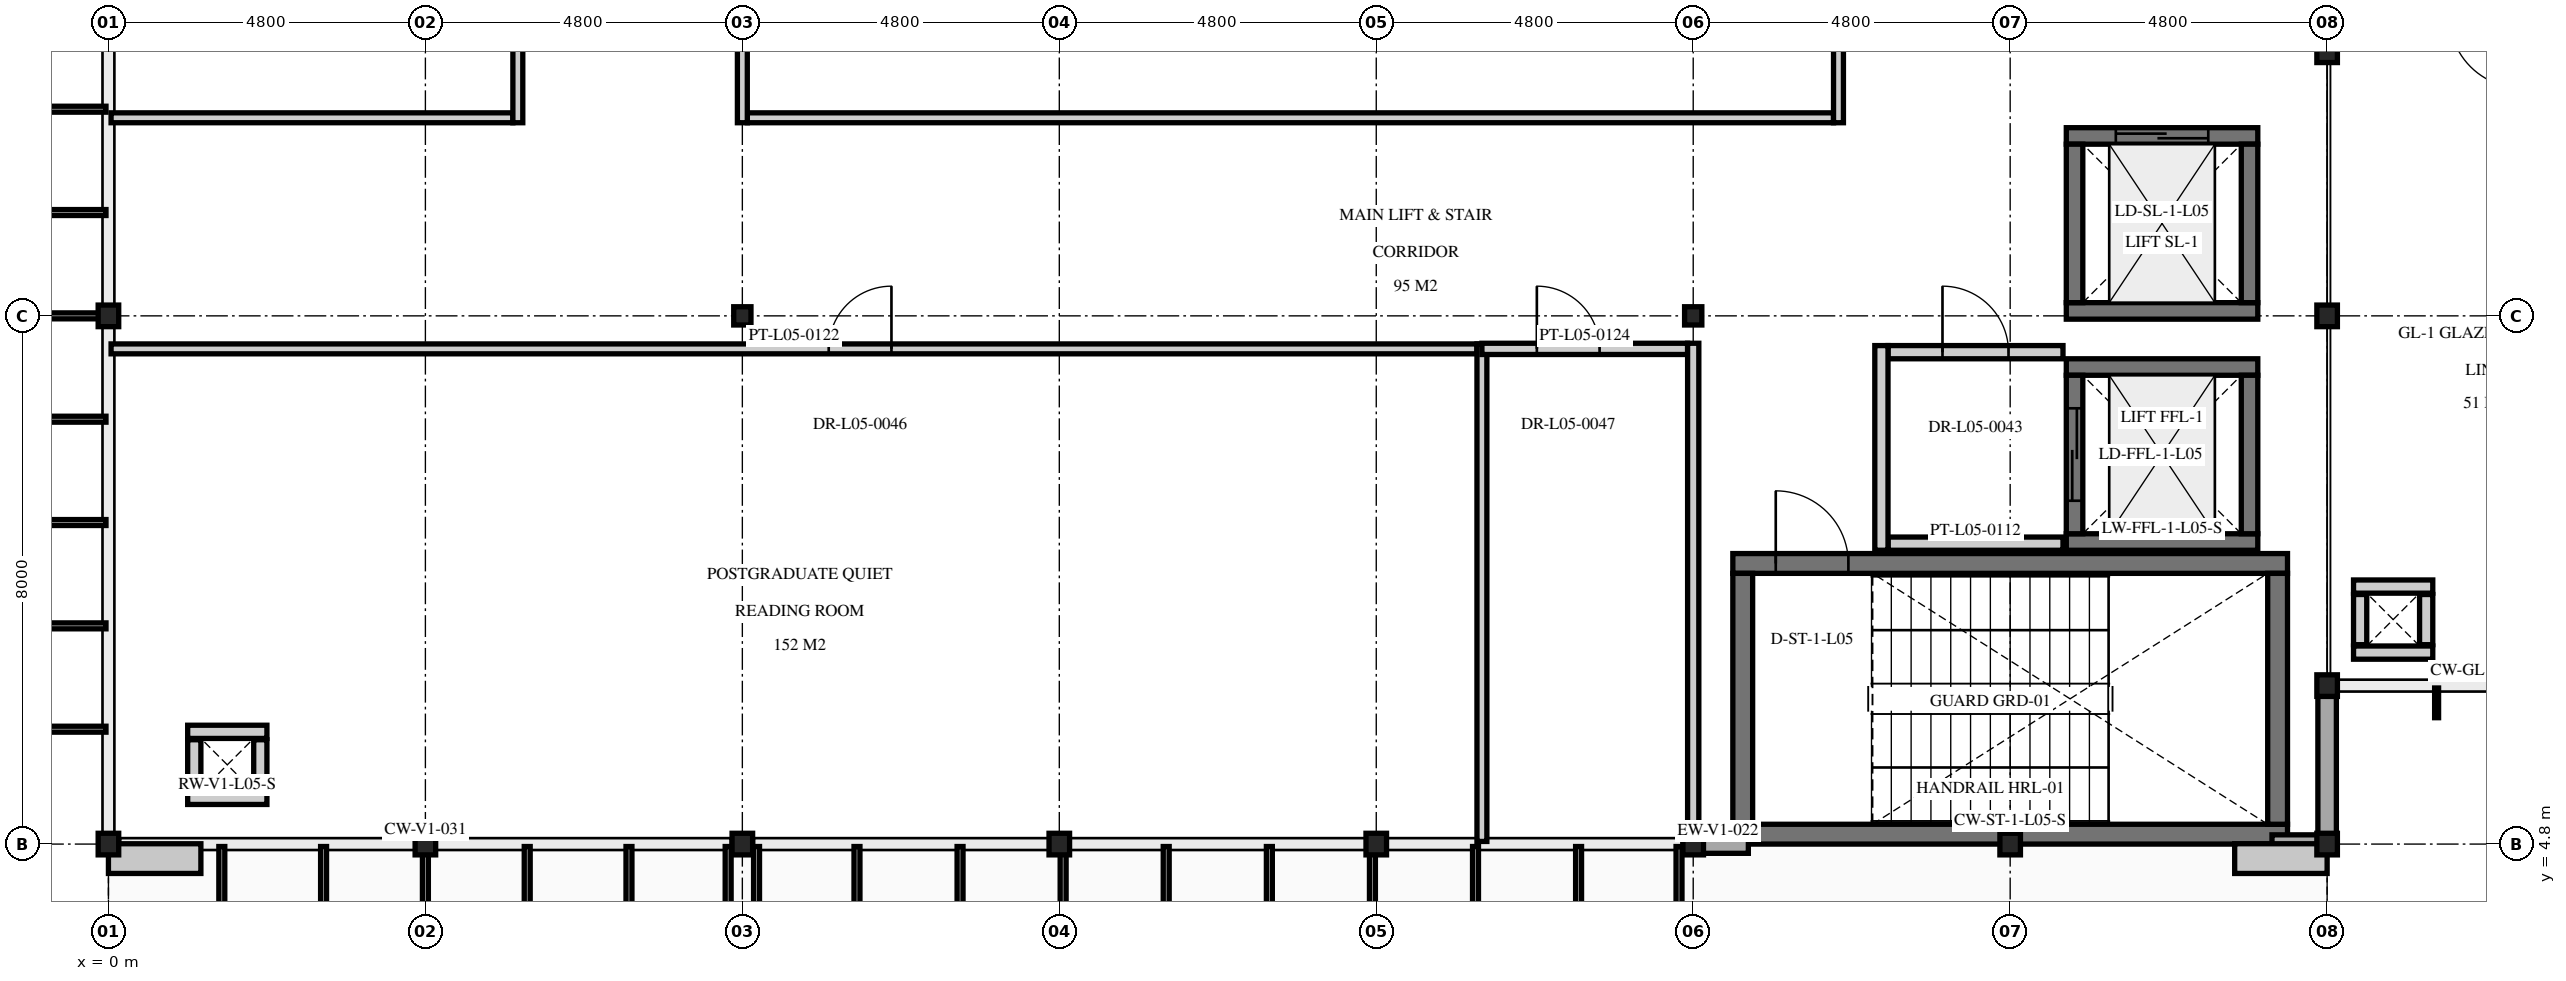
"""IFC4 building model, lengths in metres.
Left out: names, types, materials, properties, quantities, classifications, styles, units other than length and angle.
Written with IfcOpenShell. Run it as: python <this file> out.ifc"""

import sys

from ifc_helpers import new_model, si_unit, direction, frame, frame_2d, origin, origin_2d, place, context, subcontext, project, spatial, rectangle, i_section, extrude, element, fill, save


model = new_model("IFC4")
c1 = context("Model", 3, precision=1e-05, world=origin(), true_north=direction((0.0, 1.0)))
c2 = subcontext(c1, "Body", "Model", "MODEL_VIEW")
j1 = project(units=[si_unit("LENGTHUNIT", "METRE"), si_unit("PLANEANGLEUNIT", "RADIAN")], contexts=[c1])
p1 = place(None, origin())
s1 = spatial("IfcSite", under=j1, at=p1, CompositionType="ELEMENT")
p2 = place(p1, origin())
s2 = spatial("IfcBuilding", under=s1, at=p2, CompositionType="ELEMENT")
p3 = place(p2, frame((0.0, 0.0, 23.1)))
s3 = spatial("IfcBuildingStorey", under=s2, at=p3, CompositionType="ELEMENT", Elevation=23.1)
for number, where, z_axis, x_axis in (
    (1, (0.0, 4.8, 0.0), (0.0, 0.0, 1.0), (1.0, 0.0, 0.0)),
    (2, (4.8, 4.8, 0.0), (0.0, 0.0, 1.0), (1.0, 0.0, 0.0)),
    (3, (9.6, 4.8, 0.0), (0.0, 0.0, 1.0), (1.0, 0.0, 0.0)),
    (4, (14.4, 4.8, 0.0), (0.0, 0.0, 1.0), (1.0, 0.0, 0.0)),
    (5, (19.2, 4.8, 0.0), (0.0, 0.0, 1.0), (1.0, 0.0, 0.0)),
    (6, (24.0, 4.8, 0.0), (0.0, 0.0, 1.0), (1.0, 0.0, 0.0)),
    (7, (28.8, 4.8, 0.0), (0.0, 0.0, 1.0), (1.0, 0.0, 0.0)),
    (8, (33.6, 4.8, 0.0), (0.0, 0.0, 1.0), (1.0, 0.0, 0.0)),
    (9, (0.0, 12.8, 0.0), (0.0, 0.0, 1.0), (1.0, 0.0, 0.0)),
    (10, (33.6, 7.2, 0.0), (0.0, 0.0, 1.0), (1.0, 0.0, 0.0)),
    (11, (33.6, 12.8, 0.0), (0.0, 0.0, 1.0), (1.0, 0.0, 0.0)),
    (12, (33.6, 16.8, 0.0), (0.0, 0.0, 1.0), (1.0, 0.0, 0.0)),
):
    element("IfcColumn", number, at=place(p3, frame(where, z_axis=z_axis, x_axis=x_axis)), inside=s3, PredefinedType="COLUMN", context=c2, shape_type="SweptSolid", body=[
        extrude(i_section(OverallWidth=0.311, OverallDepth=0.327, WebThickness=0.016, FlangeThickness=0.025, at=origin_2d()), origin(), (0.0, 0.0, 1.0), 4.5),
    ])
for number, where, z_axis, x_axis in (
    (13, (9.6, 12.8, 0.0), (0.0, 0.0, 1.0), (1.0, 0.0, 0.0)),
    (14, (24.0, 12.8, 0.0), (0.0, 0.0, 1.0), (1.0, 0.0, 0.0)),
):
    element("IfcColumn", number, at=place(p3, frame(where, z_axis=z_axis, x_axis=x_axis)), inside=s3, PredefinedType="COLUMN", context=c2, shape_type="SweptSolid", body=[
        extrude(i_section(OverallWidth=0.261, OverallDepth=0.276, WebThickness=0.015, FlangeThickness=0.025, at=origin_2d()), origin(), (0.0, 0.0, 1.0), 4.31),
    ])
p4 = place(p3, frame((33.0, 4.95, 0.0), z_axis=(0.0, 0.0, 1.0), x_axis=(-1.0, 0.0, 0.0)))
e15 = element("IfcWall", 15, at=p4, inside=s3, PredefinedType="SHEAR", context=c2, shape_type="SweptSolid", body=[
    extrude(rectangle(XDim=8.4, YDim=0.3, at=frame_2d((4.2, 0.0))), origin(), (0.0, 0.0, 1.0), 4.29),
])
p5 = place(p3, frame((24.6, 9.05, 0.0), z_axis=(0.0, 0.0, 1.0), x_axis=(1.0, 0.0, 0.0)))
e16 = element("IfcWall", 16, at=p5, inside=s3, PredefinedType="SHEAR", context=c2, shape_type="SweptSolid", body=[
    extrude(rectangle(XDim=8.4, YDim=0.3, at=frame_2d((4.2, 0.0))), origin(), (0.0, 0.0, 1.0), 4.29),
])
p6 = place(p5, frame((0.65, 0.0, 0.0)))
e17 = element("IfcOpeningElement", 17, at=p6, cuts=e16, PredefinedType="OPENING", context=c2, shape_type="SweptSolid", body=[
    extrude(rectangle(XDim=1.1, YDim=2.2, at=frame_2d((0.55, 1.1))), frame((0.0, 0.16, 0.0), z_axis=(0.0, -1.0, 0.0), x_axis=(1.0, 0.0, 0.0)), (0.0, 0.0, 1.0), 0.32),
])
for number, where, z_axis, x_axis in (
    (18, (24.75, 5.1, 0.0), (0.0, 0.0, 1.0), (0.0, 1.0, 0.0)),
    (19, (32.85, 8.9, 0.0), (0.0, 0.0, 1.0), (0.0, -1.0, 0.0)),
):
    element("IfcWall", number, at=place(p3, frame(where, z_axis=z_axis, x_axis=x_axis)), inside=s3, PredefinedType="SHEAR", context=c2, shape_type="SweptSolid", body=[
        extrude(rectangle(XDim=3.8, YDim=0.3, at=frame_2d((1.9, 0.0))), origin(), (0.0, 0.0, 1.0), 4.29),
    ])
for number, where, z_axis, x_axis in (
    (20, (32.55, 9.375, 0.0), (0.0, 0.0, 1.0), (-1.0, 0.0, 0.0)),
    (21, (29.65, 12.025, 0.0), (0.0, 0.0, 1.0), (1.0, 0.0, 0.0)),
):
    element("IfcWall", number, at=place(p3, frame(where, z_axis=z_axis, x_axis=x_axis)), inside=s3, PredefinedType="SHEAR", context=c2, shape_type="SweptSolid", body=[
        extrude(rectangle(XDim=2.9, YDim=0.25, at=frame_2d((1.45, 0.0))), origin(), (0.0, 0.0, 1.0), 4.29),
    ])
p7 = place(p3, frame((29.775, 9.5, 0.0), z_axis=(0.0, 0.0, 1.0), x_axis=(0.0, 1.0, 0.0)))
e22 = element("IfcWall", 22, at=p7, inside=s3, PredefinedType="SHEAR", context=c2, shape_type="SweptSolid", body=[
    extrude(rectangle(XDim=2.4, YDim=0.25, at=frame_2d((1.2, 0.0))), origin(), (0.0, 0.0, 1.0), 4.29),
])
p8 = place(p7, frame((0.5, 0.0, 0.0)))
e23 = element("IfcOpeningElement", 23, at=p8, cuts=e22, PredefinedType="OPENING", context=c2, shape_type="SweptSolid", body=[
    extrude(rectangle(XDim=1.4, YDim=2.2, at=frame_2d((0.7, 1.1))), frame((0.0, 0.135, 0.0), z_axis=(0.0, -1.0, 0.0), x_axis=(1.0, 0.0, 0.0)), (0.0, 0.0, 1.0), 0.27),
])
p9 = place(p3, frame((32.425, 11.9, 0.0), z_axis=(0.0, 0.0, 1.0), x_axis=(0.0, -1.0, 0.0)))
e24 = element("IfcWall", 24, at=p9, inside=s3, PredefinedType="SHEAR", context=c2, shape_type="SweptSolid", body=[
    extrude(rectangle(XDim=2.4, YDim=0.25, at=frame_2d((1.2, 0.0))), origin(), (0.0, 0.0, 1.0), 4.29),
])
p10 = place(p3, frame((32.55, 12.875, 0.0), z_axis=(0.0, 0.0, 1.0), x_axis=(-1.0, 0.0, 0.0)))
e25 = element("IfcWall", 25, at=p10, inside=s3, PredefinedType="SHEAR", context=c2, shape_type="SweptSolid", body=[
    extrude(rectangle(XDim=2.9, YDim=0.25, at=frame_2d((1.45, 0.0))), origin(), (0.0, 0.0, 1.0), 4.29),
])
p11 = place(p3, frame((29.65, 15.525, 0.0), z_axis=(0.0, 0.0, 1.0), x_axis=(1.0, 0.0, 0.0)))
e26 = element("IfcWall", 26, at=p11, inside=s3, PredefinedType="SHEAR", context=c2, shape_type="SweptSolid", body=[
    extrude(rectangle(XDim=2.9, YDim=0.25, at=frame_2d((1.45, 0.0))), origin(), (0.0, 0.0, 1.0), 4.29),
])
p12 = place(p11, frame((0.75, 0.0, 0.0)))
e27 = element("IfcOpeningElement", 27, at=p12, cuts=e26, PredefinedType="OPENING", context=c2, shape_type="SweptSolid", body=[
    extrude(rectangle(XDim=1.4, YDim=2.2, at=frame_2d((0.7, 1.1))), frame((0.0, 0.135, 0.0), z_axis=(0.0, -1.0, 0.0), x_axis=(1.0, 0.0, 0.0)), (0.0, 0.0, 1.0), 0.27),
])
for number, where, z_axis, x_axis in (
    (28, (29.775, 13.0, 0.0), (0.0, 0.0, 1.0), (0.0, 1.0, 0.0)),
    (29, (32.425, 15.4, 0.0), (0.0, 0.0, 1.0), (0.0, -1.0, 0.0)),
):
    element("IfcWall", number, at=place(p3, frame(where, z_axis=z_axis, x_axis=x_axis)), inside=s3, PredefinedType="SHEAR", context=c2, shape_type="SweptSolid", body=[
        extrude(rectangle(XDim=2.4, YDim=0.25, at=frame_2d((1.2, 0.0))), origin(), (0.0, 0.0, 1.0), 4.29),
    ])
for number, where, z_axis, x_axis in (
    (30, (2.4, 5.5, 0.0), (0.0, 0.0, 1.0), (-1.0, 0.0, 0.0)),
    (31, (1.2, 6.5, 0.0), (0.0, 0.0, 1.0), (1.0, 0.0, 0.0)),
):
    element("IfcWall", number, at=place(p3, frame(where, z_axis=z_axis, x_axis=x_axis)), inside=s3, PredefinedType="PARTITIONING", context=c2, shape_type="SweptSolid", body=[
        extrude(rectangle(XDim=1.2, YDim=0.2, at=frame_2d((0.6, 0.0))), origin(), (0.0, 0.0, 1.0), 3.79),
    ])
for number, where, z_axis, x_axis in (
    (32, (1.3, 5.62, 0.0), (0.0, 0.0, 1.0), (0.0, 1.0, 0.0)),
    (33, (2.3, 6.38, 0.0), (0.0, 0.0, 1.0), (0.0, -1.0, 0.0)),
):
    element("IfcWall", number, at=place(p3, frame(where, z_axis=z_axis, x_axis=x_axis)), inside=s3, PredefinedType="PARTITIONING", context=c2, shape_type="SweptSolid", body=[
        extrude(rectangle(XDim=0.76, YDim=0.2, at=frame_2d((0.38, 0.0))), origin(), (0.0, 0.0, 1.0), 3.79),
    ])
for number, where, z_axis, x_axis in (
    (34, (35.2, 7.7, 0.0), (0.0, 0.0, 1.0), (-1.0, 0.0, 0.0)),
    (35, (34.0, 8.7, 0.0), (0.0, 0.0, 1.0), (1.0, 0.0, 0.0)),
):
    element("IfcWall", number, at=place(p3, frame(where, z_axis=z_axis, x_axis=x_axis)), inside=s3, PredefinedType="PARTITIONING", context=c2, shape_type="SweptSolid", body=[
        extrude(rectangle(XDim=1.2, YDim=0.2, at=frame_2d((0.6, 0.0))), origin(), (0.0, 0.0, 1.0), 3.79),
    ])
for number, where, z_axis, x_axis in (
    (36, (34.1, 7.82, 0.0), (0.0, 0.0, 1.0), (0.0, 1.0, 0.0)),
    (37, (35.1, 8.58, 0.0), (0.0, 0.0, 1.0), (0.0, -1.0, 0.0)),
):
    element("IfcWall", number, at=place(p3, frame(where, z_axis=z_axis, x_axis=x_axis)), inside=s3, PredefinedType="PARTITIONING", context=c2, shape_type="SweptSolid", body=[
        extrude(rectangle(XDim=0.76, YDim=0.2, at=frame_2d((0.38, 0.0))), origin(), (0.0, 0.0, 1.0), 3.79),
    ])
p13 = place(p3, frame((24.835, 4.8, 0.0), z_axis=(0.0, 0.0, 1.0), x_axis=(-1.0, 0.0, 0.0)))
e38 = element("IfcWall", 38, at=p13, inside=s3, PredefinedType="SOLIDWALL", context=c2, shape_type="SweptSolid", body=[
    extrude(rectangle(XDim=0.92, YDim=0.28, at=frame_2d((0.46, 0.0))), origin(), (0.0, 0.0, 1.0), 3.653),
])
p14 = place(p3, frame((33.685, 4.8, 0.0), z_axis=(0.0, 0.0, 1.0), x_axis=(-1.0, 0.0, 0.0)))
e39 = element("IfcWall", 39, at=p14, inside=s3, PredefinedType="SOLIDWALL", context=c2, shape_type="SweptSolid", body=[
    extrude(rectangle(XDim=0.92, YDim=0.28, at=frame_2d((0.46, 0.0))), origin(), (0.0, 0.0, 1.0), 3.653),
])
p15 = place(p3, frame((33.6, 7.285, 0.0), z_axis=(0.0, 0.0, 1.0), x_axis=(0.0, -1.0, 0.0)))
e40 = element("IfcWall", 40, at=p15, inside=s3, PredefinedType="SOLIDWALL", context=c2, shape_type="SweptSolid", body=[
    extrude(rectangle(XDim=2.57, YDim=0.28, at=frame_2d((1.285, 0.0))), origin(), (0.0, 0.0, 1.0), 3.653),
])
p16 = place(p3, frame((26.95, 9.35, 0.0), z_axis=(0.0, 0.0, 1.0), x_axis=(1.0, 0.0, 0.0)))
e41 = element("IfcWall", 41, at=p16, inside=s3, PredefinedType="PARTITIONING", context=c2, shape_type="SweptSolid", body=[
    extrude(rectangle(XDim=2.65, YDim=0.2, at=frame_2d((1.325, 0.0))), origin(), (0.0, 0.0, 1.0), 4.29),
])
p17 = place(p3, frame((26.95, 12.25, 0.0), z_axis=(0.0, 0.0, 1.0), x_axis=(1.0, 0.0, 0.0)))
e42 = element("IfcWall", 42, at=p17, inside=s3, PredefinedType="PARTITIONING", context=c2, shape_type="SweptSolid", body=[
    extrude(rectangle(XDim=2.65, YDim=0.2, at=frame_2d((1.325, 0.0))), origin(), (0.0, 0.0, 1.0), 4.29),
])
p18 = place(p17, frame((0.825, 0.0, 0.0)))
e43 = element("IfcOpeningElement", 43, at=p18, cuts=e42, PredefinedType="OPENING", context=c2, shape_type="SweptSolid", body=[
    extrude(rectangle(XDim=1.0, YDim=2.2, at=frame_2d((0.5, 1.1))), frame((0.0, 0.11, 0.0), z_axis=(0.0, -1.0, 0.0), x_axis=(1.0, 0.0, 0.0)), (0.0, 0.0, 1.0), 0.22),
])
p19 = place(p3, frame((26.85, 9.25, 0.0), z_axis=(0.0, 0.0, 1.0), x_axis=(0.0, 1.0, 0.0)))
e44 = element("IfcWall", 44, at=p19, inside=s3, PredefinedType="PARTITIONING", context=c2, shape_type="SweptSolid", body=[
    extrude(rectangle(XDim=3.1, YDim=0.2, at=frame_2d((1.55, 0.0))), origin(), (0.0, 0.0, 1.0), 4.29),
])
p20 = place(p3, frame((0.04, 12.3, 0.0), z_axis=(0.0, 0.0, 1.0), x_axis=(1.0, 0.0, 0.0)))
e45 = element("IfcWall", 45, at=p20, inside=s3, PredefinedType="PARTITIONING", context=c2, shape_type="SweptSolid", body=[
    extrude(rectangle(XDim=20.685, YDim=0.15, at=frame_2d((10.343, 0.0))), origin(), (0.0, 0.0, 1.0), 3.662),
])
p21 = place(p20, frame((10.868, 0.0, 0.0)))
e46 = element("IfcOpeningElement", 46, at=p21, cuts=e45, PredefinedType="OPENING", context=c2, shape_type="SweptSolid", body=[
    extrude(rectangle(XDim=0.95, YDim=2.15, at=frame_2d((0.475, 1.075))), frame((0.0, 0.085, 0.0), z_axis=(0.0, -1.0, 0.0), x_axis=(1.0, 0.0, 0.0)), (0.0, 0.0, 1.0), 0.17),
])
p22 = place(p3, frame((20.8, 4.84, 0.0), z_axis=(0.0, 0.0, 1.0), x_axis=(0.0, 1.0, 0.0)))
e47 = element("IfcWall", 47, at=p22, inside=s3, PredefinedType="PARTITIONING", context=c2, shape_type="SweptSolid", body=[
    extrude(rectangle(XDim=7.535, YDim=0.15, at=frame_2d((3.768, 0.0))), origin(), (0.0, 0.0, 1.0), 3.653),
])
p23 = place(p3, frame((20.8, 12.3, 0.0), z_axis=(0.0, 0.0, 1.0), x_axis=(1.0, 0.0, 0.0)))
e48 = element("IfcWall", 48, at=p23, inside=s3, PredefinedType="PARTITIONING", context=c2, shape_type="SweptSolid", body=[
    extrude(rectangle(XDim=3.115, YDim=0.17, at=frame_2d((1.558, 0.0))), origin(), (0.0, 0.0, 1.0), 3.662),
])
p24 = place(p23, frame((0.832, 0.0, 0.0)))
e49 = element("IfcOpeningElement", 49, at=p24, cuts=e48, PredefinedType="OPENING", context=c2, shape_type="SweptSolid", body=[
    extrude(rectangle(XDim=0.95, YDim=2.15, at=frame_2d((0.475, 1.075))), frame((0.0, 0.095, 0.0), z_axis=(0.0, -1.0, 0.0), x_axis=(1.0, 0.0, 0.0)), (0.0, 0.0, 1.0), 0.19),
])
p25 = place(p3, frame((24.0, 4.84, 0.0), z_axis=(0.0, 0.0, 1.0), x_axis=(0.0, 1.0, 0.0)))
e50 = element("IfcWall", 50, at=p25, inside=s3, PredefinedType="PARTITIONING", context=c2, shape_type="SweptSolid", body=[
    extrude(rectangle(XDim=7.545, YDim=0.17, at=frame_2d((3.772, 0.0))), origin(), (0.0, 0.0, 1.0), 3.653),
])
p26 = place(p3, frame((0.04, 15.8, 0.0), z_axis=(0.0, 0.0, 1.0), x_axis=(1.0, 0.0, 0.0)))
e51 = element("IfcWall", 51, at=p26, inside=s3, PredefinedType="PARTITIONING", context=c2, shape_type="SweptSolid", body=[
    extrude(rectangle(XDim=6.085, YDim=0.15, at=frame_2d((3.042, 0.0))), origin(), (0.0, 0.0, 1.0), 3.662),
])
p27 = place(p3, frame((6.2, 15.725, 0.0), z_axis=(0.0, 0.0, 1.0), x_axis=(0.0, 1.0, 0.0)))
e52 = element("IfcWall", 52, at=p27, inside=s3, PredefinedType="PARTITIONING", context=c2, shape_type="SweptSolid", body=[
    extrude(rectangle(XDim=14.45, YDim=0.15, at=frame_2d((7.225, 0.0))), origin(), (0.0, 0.0, 1.0), 3.653),
])
p28 = place(p27, frame((6.75, 0.0, 0.0)))
e53 = element("IfcOpeningElement", 53, at=p28, cuts=e52, PredefinedType="OPENING", context=c2, shape_type="SweptSolid", body=[
    extrude(rectangle(XDim=0.95, YDim=2.15, at=frame_2d((0.475, 1.075))), frame((0.0, 0.085, 0.0), z_axis=(0.0, -1.0, 0.0), x_axis=(1.0, 0.0, 0.0)), (0.0, 0.0, 1.0), 0.17),
])
p29 = place(p3, frame((9.675, 15.8, 0.0), z_axis=(0.0, 0.0, 1.0), x_axis=(1.0, 0.0, 0.0)))
e54 = element("IfcWall", 54, at=p29, inside=s3, PredefinedType="PARTITIONING", context=c2, shape_type="SweptSolid", body=[
    extrude(rectangle(XDim=16.45, YDim=0.15, at=frame_2d((8.225, 0.0))), origin(), (0.0, 0.0, 1.0), 3.662),
])
p30 = place(p3, frame((9.6, 15.725, 0.0), z_axis=(0.0, 0.0, 1.0), x_axis=(0.0, 1.0, 0.0)))
e55 = element("IfcWall", 55, at=p30, inside=s3, PredefinedType="PARTITIONING", context=c2, shape_type="SweptSolid", body=[
    extrude(rectangle(XDim=21.035, YDim=0.15, at=frame_2d((10.518, 0.0))), origin(), (0.0, 0.0, 1.0), 3.653),
])
p31 = place(p30, frame((10.042, 0.0, 0.0)))
e56 = element("IfcOpeningElement", 56, at=p31, cuts=e55, PredefinedType="OPENING", context=c2, shape_type="SweptSolid", body=[
    extrude(rectangle(XDim=0.95, YDim=2.15, at=frame_2d((0.475, 1.075))), frame((0.0, 0.085, 0.0), z_axis=(0.0, -1.0, 0.0), x_axis=(1.0, 0.0, 0.0)), (0.0, 0.0, 1.0), 0.17),
])
p32 = place(p3, frame((26.2, 15.725, 0.0), z_axis=(0.0, 0.0, 1.0), x_axis=(0.0, 1.0, 0.0)))
e57 = element("IfcWall", 57, at=p32, inside=s3, PredefinedType="PARTITIONING", context=c2, shape_type="SweptSolid", body=[
    extrude(rectangle(XDim=21.035, YDim=0.15, at=frame_2d((10.518, 0.0))), origin(), (0.0, 0.0, 1.0), 3.653),
])
p33 = place(p6, origin())
e58 = element("IfcDoor", 58, at=p33, inside=s3, OperationType="SINGLE_SWING_LEFT", PredefinedType="DOOR", context=c2, shape_type="SweptSolid", body=[
    extrude(rectangle(XDim=1.1, YDim=2.2, at=frame_2d((0.55, 1.1))), frame((0.0, 0.025, 0.0), z_axis=(0.0, -1.0, 0.0), x_axis=(1.0, 0.0, 0.0)), (0.0, 0.0, 1.0), 0.05),
])
fill(e17, e58)
p34 = place(p8, origin())
e59 = element("IfcDoor", 59, at=p34, inside=s3, OperationType="DOUBLE_DOOR_SLIDING", PredefinedType="DOOR", context=c2, shape_type="SweptSolid", body=[
    extrude(rectangle(XDim=1.4, YDim=2.2, at=frame_2d((0.7, 1.1))), frame((0.0, 0.025, 0.0), z_axis=(0.0, -1.0, 0.0), x_axis=(1.0, 0.0, 0.0)), (0.0, 0.0, 1.0), 0.05),
])
fill(e23, e59)
p35 = place(p12, origin())
e60 = element("IfcDoor", 60, at=p35, inside=s3, OperationType="DOUBLE_DOOR_SLIDING", PredefinedType="DOOR", context=c2, shape_type="SweptSolid", body=[
    extrude(rectangle(XDim=1.4, YDim=2.2, at=frame_2d((0.7, 1.1))), frame((0.0, 0.025, 0.0), z_axis=(0.0, -1.0, 0.0), x_axis=(1.0, 0.0, 0.0)), (0.0, 0.0, 1.0), 0.05),
])
fill(e27, e60)
p36 = place(p18, origin())
e61 = element("IfcDoor", 61, at=p36, inside=s3, OperationType="SINGLE_SWING_LEFT", PredefinedType="DOOR", context=c2, shape_type="SweptSolid", body=[
    extrude(rectangle(XDim=1.0, YDim=2.2, at=frame_2d((0.5, 1.1))), frame((0.0, 0.025, 0.0), z_axis=(0.0, -1.0, 0.0), x_axis=(1.0, 0.0, 0.0)), (0.0, 0.0, 1.0), 0.05),
])
fill(e43, e61)
p37 = place(p21, origin())
e62 = element("IfcDoor", 62, at=p37, inside=s3, OperationType="SINGLE_SWING_RIGHT", PredefinedType="DOOR", context=c2, shape_type="SweptSolid", body=[
    extrude(rectangle(XDim=0.95, YDim=2.15, at=frame_2d((0.475, 1.075))), frame((0.0, 0.025, 0.0), z_axis=(0.0, -1.0, 0.0), x_axis=(1.0, 0.0, 0.0)), (0.0, 0.0, 1.0), 0.05),
])
fill(e46, e62)
p38 = place(p24, origin())
e63 = element("IfcDoor", 63, at=p38, inside=s3, OperationType="SINGLE_SWING_LEFT", PredefinedType="DOOR", context=c2, shape_type="SweptSolid", body=[
    extrude(rectangle(XDim=0.95, YDim=2.15, at=frame_2d((0.475, 1.075))), frame((0.0, 0.025, 0.0), z_axis=(0.0, -1.0, 0.0), x_axis=(1.0, 0.0, 0.0)), (0.0, 0.0, 1.0), 0.05),
])
fill(e49, e63)
save(model, sys.argv[1])
